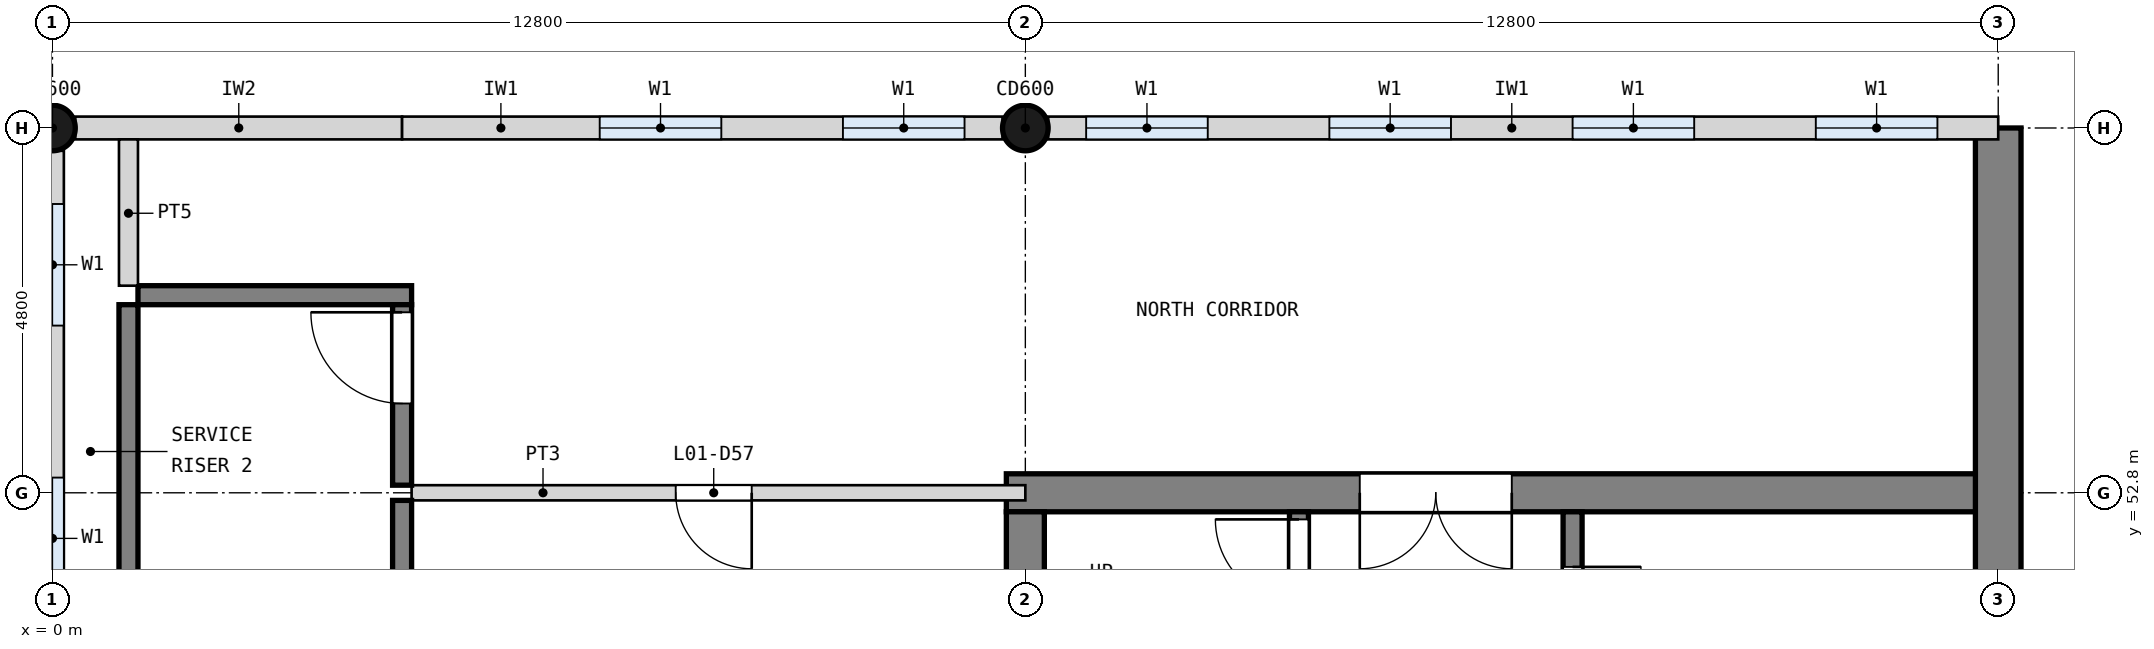
"""IFC4 building model, lengths in metres.
Left out: names, types, materials, properties, quantities, classifications, styles, units other than length and angle.
Written with IfcOpenShell. Run it as: python <this file> out.ifc"""

import sys

from ifc_helpers import new_model, si_unit, direction, frame, frame_2d, origin, origin_2d, place, context, subcontext, project, spatial, rectangle, circle, extrude, element, fill, save


model = new_model("IFC4")
c1 = context("Model", 3, precision=1e-05, world=origin(), true_north=direction((0.0, 1.0)))
c2 = subcontext(c1, "Body", "Model", "MODEL_VIEW")
j1 = project(units=[si_unit("LENGTHUNIT", "METRE"), si_unit("PLANEANGLEUNIT", "RADIAN")], contexts=[c1])
p1 = place(None, origin())
s1 = spatial("IfcSite", under=j1, at=p1, CompositionType="ELEMENT")
p2 = place(p1, origin())
s2 = spatial("IfcBuilding", under=s1, at=p2, CompositionType="ELEMENT")
p3 = place(p2, frame((0.0, 0.0, 4.2)))
s3 = spatial("IfcBuildingStorey", under=s2, at=p3, CompositionType="ELEMENT", Elevation=4.2)
p4 = place(p3, frame((12.55, 52.8, 0.0), z_axis=(0.0, 0.0, 1.0), x_axis=(1.0, 0.0, 0.0)))
e1 = element("IfcWall", 1, at=p4, inside=s3, PredefinedType="SHEAR", context=c2, shape_type="SweptSolid", body=[
    extrude(rectangle(XDim=13.3, YDim=0.5, at=frame_2d((6.65, 0.0))), origin(), (0.0, 0.0, 1.0), 4.2),
])
p5 = place(p4, frame((4.65, 0.0, 0.0)))
e2 = element("IfcOpeningElement", 2, at=p5, cuts=e1, PredefinedType="OPENING", context=c2, shape_type="SweptSolid", body=[
    extrude(rectangle(XDim=2.0, YDim=2.1, at=frame_2d((1.0, 1.05))), frame((0.0, 0.26, 0.0), z_axis=(0.0, -1.0, 0.0), x_axis=(1.0, 0.0, 0.0)), (0.0, 0.0, 1.0), 0.52),
])
p6 = place(p3, frame((12.8, 33.85, 0.0), z_axis=(0.0, 0.0, 1.0), x_axis=(0.0, 1.0, 0.0)))
e3 = element("IfcWall", 3, at=p6, inside=s3, PredefinedType="SHEAR", context=c2, shape_type="SweptSolid", body=[
    extrude(rectangle(XDim=18.7, YDim=0.5, at=frame_2d((9.35, 0.0))), origin(), (0.0, 0.0, 1.0), 4.2),
])
p7 = place(p3, frame((25.6, 28.8, 0.0), z_axis=(0.0, 0.0, 1.0), x_axis=(0.0, 1.0, 0.0)))
e4 = element("IfcWall", 4, at=p7, inside=s3, PredefinedType="SHEAR", context=c2, shape_type="SweptSolid", body=[
    extrude(rectangle(XDim=28.8, YDim=0.6, at=frame_2d((14.4, 0.0))), origin(), (0.0, 0.0, 1.0), 4.2),
])
for number, where, z_axis, x_axis in (
    (5, (0.0, 57.6, 0.0), (0.0, 0.0, 1.0), (1.0, 0.0, 0.0)),
    (6, (12.8, 57.6, 0.0), (0.0, 0.0, 1.0), (1.0, 0.0, 0.0)),
):
    element("IfcColumn", number, at=place(p3, frame(where, z_axis=z_axis, x_axis=x_axis)), inside=s3, PredefinedType="COLUMN", context=c2, shape_type="SweptSolid", body=[
        extrude(circle(Radius=0.3, at=origin_2d()), origin(), (0.0, 0.0, 1.0), 4.2),
    ])
p8 = place(p3, frame((0.3, 57.6, 0.0), z_axis=(0.0, 0.0, 1.0), x_axis=(1.0, 0.0, 0.0)))
e7 = element("IfcWall", 7, at=p8, inside=s3, PredefinedType="SOLIDWALL", context=c2, shape_type="SweptSolid", body=[
    extrude(rectangle(XDim=4.3, YDim=0.3, at=frame_2d((2.15, 0.0))), origin(), (0.0, 0.0, 1.0), 3.0),
])
p9 = place(p3, frame((4.6, 57.6, 0.0), z_axis=(0.0, 0.0, 1.0), x_axis=(1.0, 0.0, 0.0)))
e8 = element("IfcWall", 8, at=p9, inside=s3, PredefinedType="SOLIDWALL", context=c2, shape_type="SweptSolid", body=[
    extrude(rectangle(XDim=7.9, YDim=0.3, at=frame_2d((3.95, 0.0))), origin(), (0.0, 0.0, 1.0), 3.0),
])
p10 = place(p9, frame((2.6, 0.0, 1.0)))
e9 = element("IfcOpeningElement", 9, at=p10, cuts=e8, PredefinedType="OPENING", context=c2, shape_type="SweptSolid", body=[
    extrude(rectangle(XDim=1.6, YDim=1.8, at=frame_2d((0.8, 0.9))), frame((0.0, 0.16, 0.0), z_axis=(0.0, -1.0, 0.0), x_axis=(1.0, 0.0, 0.0)), (0.0, 0.0, 1.0), 0.32),
])
p11 = place(p9, frame((5.8, 0.0, 1.0)))
e10 = element("IfcOpeningElement", 10, at=p11, cuts=e8, PredefinedType="OPENING", context=c2, shape_type="SweptSolid", body=[
    extrude(rectangle(XDim=1.6, YDim=1.8, at=frame_2d((0.8, 0.9))), frame((0.0, 0.16, 0.0), z_axis=(0.0, -1.0, 0.0), x_axis=(1.0, 0.0, 0.0)), (0.0, 0.0, 1.0), 0.32),
])
p12 = place(p3, frame((13.1, 57.6, 0.0), z_axis=(0.0, 0.0, 1.0), x_axis=(1.0, 0.0, 0.0)))
e11 = element("IfcWall", 11, at=p12, inside=s3, PredefinedType="SOLIDWALL", context=c2, shape_type="SweptSolid", body=[
    extrude(rectangle(XDim=12.5, YDim=0.3, at=frame_2d((6.25, 0.0))), origin(), (0.0, 0.0, 1.0), 3.0),
])
p13 = place(p12, frame((0.5, 0.0, 1.0)))
e12 = element("IfcOpeningElement", 12, at=p13, cuts=e11, PredefinedType="OPENING", context=c2, shape_type="SweptSolid", body=[
    extrude(rectangle(XDim=1.6, YDim=1.8, at=frame_2d((0.8, 0.9))), frame((0.0, 0.16, 0.0), z_axis=(0.0, -1.0, 0.0), x_axis=(1.0, 0.0, 0.0)), (0.0, 0.0, 1.0), 0.32),
])
p14 = place(p12, frame((3.7, 0.0, 1.0)))
e13 = element("IfcOpeningElement", 13, at=p14, cuts=e11, PredefinedType="OPENING", context=c2, shape_type="SweptSolid", body=[
    extrude(rectangle(XDim=1.6, YDim=1.8, at=frame_2d((0.8, 0.9))), frame((0.0, 0.16, 0.0), z_axis=(0.0, -1.0, 0.0), x_axis=(1.0, 0.0, 0.0)), (0.0, 0.0, 1.0), 0.32),
])
p15 = place(p12, frame((6.9, 0.0, 1.0)))
e14 = element("IfcOpeningElement", 14, at=p15, cuts=e11, PredefinedType="OPENING", context=c2, shape_type="SweptSolid", body=[
    extrude(rectangle(XDim=1.6, YDim=1.8, at=frame_2d((0.8, 0.9))), frame((0.0, 0.16, 0.0), z_axis=(0.0, -1.0, 0.0), x_axis=(1.0, 0.0, 0.0)), (0.0, 0.0, 1.0), 0.32),
])
p16 = place(p12, frame((10.1, 0.0, 1.0)))
e15 = element("IfcOpeningElement", 15, at=p16, cuts=e11, PredefinedType="OPENING", context=c2, shape_type="SweptSolid", body=[
    extrude(rectangle(XDim=1.6, YDim=1.8, at=frame_2d((0.8, 0.9))), frame((0.0, 0.16, 0.0), z_axis=(0.0, -1.0, 0.0), x_axis=(1.0, 0.0, 0.0)), (0.0, 0.0, 1.0), 0.32),
])
p17 = place(p3, frame((0.0, 43.5, 0.0), z_axis=(0.0, 0.0, 1.0), x_axis=(0.0, 1.0, 0.0)))
e16 = element("IfcWall", 16, at=p17, inside=s3, PredefinedType="SOLIDWALL", context=c2, shape_type="SweptSolid", body=[
    extrude(rectangle(XDim=13.8, YDim=0.3, at=frame_2d((6.9, 0.0))), origin(), (0.0, 0.0, 1.0), 2.9),
])
p18 = place(p17, frame((0.7, 0.0, 1.0)))
e17 = element("IfcOpeningElement", 17, at=p18, cuts=e16, PredefinedType="OPENING", context=c2, shape_type="SweptSolid", body=[
    extrude(rectangle(XDim=1.6, YDim=1.8, at=frame_2d((0.8, 0.9))), frame((0.0, 0.16, 0.0), z_axis=(0.0, -1.0, 0.0), x_axis=(1.0, 0.0, 0.0)), (0.0, 0.0, 1.0), 0.32),
])
p19 = place(p17, frame((7.9, 0.0, 1.0)))
e18 = element("IfcOpeningElement", 18, at=p19, cuts=e16, PredefinedType="OPENING", context=c2, shape_type="SweptSolid", body=[
    extrude(rectangle(XDim=1.6, YDim=1.8, at=frame_2d((0.8, 0.9))), frame((0.0, 0.16, 0.0), z_axis=(0.0, -1.0, 0.0), x_axis=(1.0, 0.0, 0.0)), (0.0, 0.0, 1.0), 0.32),
])
p20 = place(p17, frame((11.5, 0.0, 1.0)))
e19 = element("IfcOpeningElement", 19, at=p20, cuts=e16, PredefinedType="OPENING", context=c2, shape_type="SweptSolid", body=[
    extrude(rectangle(XDim=1.6, YDim=1.8, at=frame_2d((0.8, 0.9))), frame((0.0, 0.16, 0.0), z_axis=(0.0, -1.0, 0.0), x_axis=(1.0, 0.0, 0.0)), (0.0, 0.0, 1.0), 0.32),
])
p21 = place(p3, frame((16.4, 46.475, 0.0), z_axis=(0.0, 0.0, 1.0), x_axis=(0.0, 1.0, 0.0)))
e20 = element("IfcWall", 20, at=p21, inside=s3, PredefinedType="SOLIDWALL", context=c2, shape_type="SweptSolid", body=[
    extrude(rectangle(XDim=6.075, YDim=0.25, at=frame_2d((3.038, 0.0))), origin(), (0.0, 0.0, 1.0), 3.9),
])
p22 = place(p21, frame((4.875, 0.0, 0.0)))
e21 = element("IfcOpeningElement", 21, at=p22, cuts=e20, PredefinedType="OPENING", context=c2, shape_type="SweptSolid", body=[
    extrude(rectangle(XDim=1.1, YDim=2.1, at=frame_2d((0.55, 1.05))), frame((0.0, 0.135, 0.0), z_axis=(0.0, -1.0, 0.0), x_axis=(1.0, 0.0, 0.0)), (0.0, 0.0, 1.0), 0.27),
])
p23 = place(p3, frame((20.0, 46.475, 0.0), z_axis=(0.0, 0.0, 1.0), x_axis=(0.0, 1.0, 0.0)))
e22 = element("IfcWall", 22, at=p23, inside=s3, PredefinedType="SOLIDWALL", context=c2, shape_type="SweptSolid", body=[
    extrude(rectangle(XDim=6.075, YDim=0.25, at=frame_2d((3.038, 0.0))), origin(), (0.0, 0.0, 1.0), 3.9),
])
p24 = place(p23, frame((1.312, 0.0, 0.0)))
e23 = element("IfcOpeningElement", 23, at=p24, cuts=e22, PredefinedType="OPENING", context=c2, shape_type="SweptSolid", body=[
    extrude(rectangle(XDim=1.0, YDim=2.1, at=frame_2d((0.5, 1.05))), frame((0.0, 0.135, 0.0), z_axis=(0.0, -1.0, 0.0), x_axis=(1.0, 0.0, 0.0)), (0.0, 0.0, 1.0), 0.27),
])
p25 = place(p23, frame((4.45, 0.0, 0.0)))
e24 = element("IfcOpeningElement", 24, at=p25, cuts=e22, PredefinedType="OPENING", context=c2, shape_type="SweptSolid", body=[
    extrude(rectangle(XDim=0.9, YDim=2.1, at=frame_2d((0.45, 1.05))), frame((0.0, 0.135, 0.0), z_axis=(0.0, -1.0, 0.0), x_axis=(1.0, 0.0, 0.0)), (0.0, 0.0, 1.0), 0.27),
])
p26 = place(p3, frame((4.725, 52.8, 0.0), z_axis=(0.0, 0.0, 1.0), x_axis=(1.0, 0.0, 0.0)))
e25 = element("IfcWall", 25, at=p26, inside=s3, PredefinedType="PARTITIONING", context=c2, shape_type="SweptSolid", body=[
    extrude(rectangle(XDim=8.075, YDim=0.2, at=frame_2d((4.038, 0.0))), origin(), (0.0, 0.0, 1.0), 3.9),
])
p27 = place(p26, frame((3.475, 0.0, 0.0)))
e26 = element("IfcOpeningElement", 26, at=p27, cuts=e25, PredefinedType="OPENING", context=c2, shape_type="SweptSolid", body=[
    extrude(rectangle(XDim=1.0, YDim=2.1, at=frame_2d((0.5, 1.05))), frame((0.0, 0.11, 0.0), z_axis=(0.0, -1.0, 0.0), x_axis=(1.0, 0.0, 0.0)), (0.0, 0.0, 1.0), 0.22),
])
p28 = place(p3, frame((1.125, 55.4, 0.0), z_axis=(0.0, 0.0, 1.0), x_axis=(1.0, 0.0, 0.0)))
e27 = element("IfcWall", 27, at=p28, inside=s3, PredefinedType="SHEAR", context=c2, shape_type="SweptSolid", body=[
    extrude(rectangle(XDim=3.6, YDim=0.25, at=frame_2d((1.8, 0.0))), origin(), (0.0, 0.0, 1.0), 3.9),
])
p29 = place(p3, frame((1.0, 49.525, 0.0), z_axis=(0.0, 0.0, 1.0), x_axis=(0.0, 1.0, 0.0)))
e28 = element("IfcWall", 28, at=p29, inside=s3, PredefinedType="SHEAR", context=c2, shape_type="SweptSolid", body=[
    extrude(rectangle(XDim=5.75, YDim=0.25, at=frame_2d((2.875, 0.0))), origin(), (0.0, 0.0, 1.0), 3.9),
])
p30 = place(p3, frame((1.0, 55.525, 0.0), z_axis=(0.0, 0.0, 1.0), x_axis=(0.0, 1.0, 0.0)))
e29 = element("IfcWall", 29, at=p30, inside=s3, PredefinedType="PARTITIONING", context=c2, shape_type="SweptSolid", body=[
    extrude(rectangle(XDim=1.925, YDim=0.25, at=frame_2d((0.962, 0.0))), origin(), (0.0, 0.0, 1.0), 3.9),
])
p31 = place(p3, frame((4.6, 49.525, 0.0), z_axis=(0.0, 0.0, 1.0), x_axis=(0.0, 1.0, 0.0)))
e30 = element("IfcWall", 30, at=p31, inside=s3, PredefinedType="SHEAR", context=c2, shape_type="SweptSolid", body=[
    extrude(rectangle(XDim=3.175, YDim=0.25, at=frame_2d((1.587, 0.0))), origin(), (0.0, 0.0, 1.0), 3.9),
])
p32 = place(p3, frame((4.6, 52.9, 0.0), z_axis=(0.0, 0.0, 1.0), x_axis=(0.0, 1.0, 0.0)))
e31 = element("IfcWall", 31, at=p32, inside=s3, PredefinedType="SHEAR", context=c2, shape_type="SweptSolid", body=[
    extrude(rectangle(XDim=2.375, YDim=0.25, at=frame_2d((1.188, 0.0))), origin(), (0.0, 0.0, 1.0), 3.9),
])
p33 = place(p32, frame((1.075, 0.0, 0.0)))
e32 = element("IfcOpeningElement", 32, at=p33, cuts=e31, PredefinedType="OPENING", context=c2, shape_type="SweptSolid", body=[
    extrude(rectangle(XDim=1.2, YDim=2.1, at=frame_2d((0.6, 1.05))), frame((0.0, 0.135, 0.0), z_axis=(0.0, -1.0, 0.0), x_axis=(1.0, 0.0, 0.0)), (0.0, 0.0, 1.0), 0.27),
])
p34 = place(p22, origin())
e33 = element("IfcDoor", 33, at=p34, inside=s3, OperationType="SINGLE_SWING_RIGHT", PredefinedType="DOOR", context=c2, shape_type="SweptSolid", body=[
    extrude(rectangle(XDim=1.1, YDim=2.1, at=frame_2d((0.55, 1.05))), frame((0.0, 0.025, 0.0), z_axis=(0.0, -1.0, 0.0), x_axis=(1.0, 0.0, 0.0)), (0.0, 0.0, 1.0), 0.05),
])
fill(e21, e33)
p35 = place(p25, frame((0.9, 0.0, 0.0), z_axis=(0.0, 0.0, 1.0), x_axis=(-1.0, 0.0, 0.0)))
e34 = element("IfcDoor", 34, at=p35, inside=s3, OperationType="SINGLE_SWING_LEFT", PredefinedType="DOOR", context=c2, shape_type="SweptSolid", body=[
    extrude(rectangle(XDim=0.9, YDim=2.1, at=frame_2d((0.45, 1.05))), frame((0.0, 0.025, 0.0), z_axis=(0.0, -1.0, 0.0), x_axis=(1.0, 0.0, 0.0)), (0.0, 0.0, 1.0), 0.05),
])
fill(e24, e34)
p36 = place(p5, frame((2.0, 0.0, 0.0), z_axis=(0.0, 0.0, 1.0), x_axis=(-1.0, 0.0, 0.0)))
e35 = element("IfcDoor", 35, at=p36, inside=s3, OperationType="DOUBLE_DOOR_SINGLE_SWING", PredefinedType="DOOR", context=c2, shape_type="SweptSolid", body=[
    extrude(rectangle(XDim=2.0, YDim=2.1, at=frame_2d((1.0, 1.05))), frame((0.0, 0.025, 0.0), z_axis=(0.0, -1.0, 0.0), x_axis=(1.0, 0.0, 0.0)), (0.0, 0.0, 1.0), 0.05),
])
fill(e2, e35)
p37 = place(p27, frame((1.0, 0.0, 0.0), z_axis=(0.0, 0.0, 1.0), x_axis=(-1.0, 0.0, 0.0)))
e36 = element("IfcDoor", 36, at=p37, inside=s3, OperationType="SINGLE_SWING_LEFT", PredefinedType="DOOR", context=c2, shape_type="SweptSolid", body=[
    extrude(rectangle(XDim=1.0, YDim=2.1, at=frame_2d((0.5, 1.05))), frame((0.0, 0.025, 0.0), z_axis=(0.0, -1.0, 0.0), x_axis=(1.0, 0.0, 0.0)), (0.0, 0.0, 1.0), 0.05),
])
fill(e26, e36)
p38 = place(p33, origin())
e37 = element("IfcDoor", 37, at=p38, inside=s3, OperationType="SINGLE_SWING_RIGHT", PredefinedType="DOOR", context=c2, shape_type="SweptSolid", body=[
    extrude(rectangle(XDim=1.2, YDim=2.1, at=frame_2d((0.6, 1.05))), frame((0.0, 0.025, 0.0), z_axis=(0.0, -1.0, 0.0), x_axis=(1.0, 0.0, 0.0)), (0.0, 0.0, 1.0), 0.05),
])
fill(e32, e37)
p39 = place(p10, origin())
e38 = element("IfcWindow", 38, at=p39, inside=s3, PartitioningType="SINGLE_PANEL", PredefinedType="WINDOW", context=c2, shape_type="SweptSolid", body=[
    extrude(rectangle(XDim=1.6, YDim=1.8, at=frame_2d((0.8, 0.9))), frame((0.0, 0.03, 0.0), z_axis=(0.0, -1.0, 0.0), x_axis=(1.0, 0.0, 0.0)), (0.0, 0.0, 1.0), 0.06),
])
fill(e9, e38)
p40 = place(p11, origin())
e39 = element("IfcWindow", 39, at=p40, inside=s3, PartitioningType="SINGLE_PANEL", PredefinedType="WINDOW", context=c2, shape_type="SweptSolid", body=[
    extrude(rectangle(XDim=1.6, YDim=1.8, at=frame_2d((0.8, 0.9))), frame((0.0, 0.03, 0.0), z_axis=(0.0, -1.0, 0.0), x_axis=(1.0, 0.0, 0.0)), (0.0, 0.0, 1.0), 0.06),
])
fill(e10, e39)
p41 = place(p13, origin())
e40 = element("IfcWindow", 40, at=p41, inside=s3, PartitioningType="SINGLE_PANEL", PredefinedType="WINDOW", context=c2, shape_type="SweptSolid", body=[
    extrude(rectangle(XDim=1.6, YDim=1.8, at=frame_2d((0.8, 0.9))), frame((0.0, 0.03, 0.0), z_axis=(0.0, -1.0, 0.0), x_axis=(1.0, 0.0, 0.0)), (0.0, 0.0, 1.0), 0.06),
])
fill(e12, e40)
p42 = place(p14, origin())
e41 = element("IfcWindow", 41, at=p42, inside=s3, PartitioningType="SINGLE_PANEL", PredefinedType="WINDOW", context=c2, shape_type="SweptSolid", body=[
    extrude(rectangle(XDim=1.6, YDim=1.8, at=frame_2d((0.8, 0.9))), frame((0.0, 0.03, 0.0), z_axis=(0.0, -1.0, 0.0), x_axis=(1.0, 0.0, 0.0)), (0.0, 0.0, 1.0), 0.06),
])
fill(e13, e41)
p43 = place(p15, origin())
e42 = element("IfcWindow", 42, at=p43, inside=s3, PartitioningType="SINGLE_PANEL", PredefinedType="WINDOW", context=c2, shape_type="SweptSolid", body=[
    extrude(rectangle(XDim=1.6, YDim=1.8, at=frame_2d((0.8, 0.9))), frame((0.0, 0.03, 0.0), z_axis=(0.0, -1.0, 0.0), x_axis=(1.0, 0.0, 0.0)), (0.0, 0.0, 1.0), 0.06),
])
fill(e14, e42)
p44 = place(p16, origin())
e43 = element("IfcWindow", 43, at=p44, inside=s3, PartitioningType="SINGLE_PANEL", PredefinedType="WINDOW", context=c2, shape_type="SweptSolid", body=[
    extrude(rectangle(XDim=1.6, YDim=1.8, at=frame_2d((0.8, 0.9))), frame((0.0, 0.03, 0.0), z_axis=(0.0, -1.0, 0.0), x_axis=(1.0, 0.0, 0.0)), (0.0, 0.0, 1.0), 0.06),
])
fill(e15, e43)
p45 = place(p19, origin())
e44 = element("IfcWindow", 44, at=p45, inside=s3, PartitioningType="SINGLE_PANEL", PredefinedType="WINDOW", context=c2, shape_type="SweptSolid", body=[
    extrude(rectangle(XDim=1.6, YDim=1.8, at=frame_2d((0.8, 0.9))), frame((0.0, 0.03, 0.0), z_axis=(0.0, -1.0, 0.0), x_axis=(1.0, 0.0, 0.0)), (0.0, 0.0, 1.0), 0.06),
])
fill(e18, e44)
p46 = place(p20, origin())
e45 = element("IfcWindow", 45, at=p46, inside=s3, PartitioningType="SINGLE_PANEL", PredefinedType="WINDOW", context=c2, shape_type="SweptSolid", body=[
    extrude(rectangle(XDim=1.6, YDim=1.8, at=frame_2d((0.8, 0.9))), frame((0.0, 0.03, 0.0), z_axis=(0.0, -1.0, 0.0), x_axis=(1.0, 0.0, 0.0)), (0.0, 0.0, 1.0), 0.06),
])
fill(e19, e45)
save(model, sys.argv[1])
